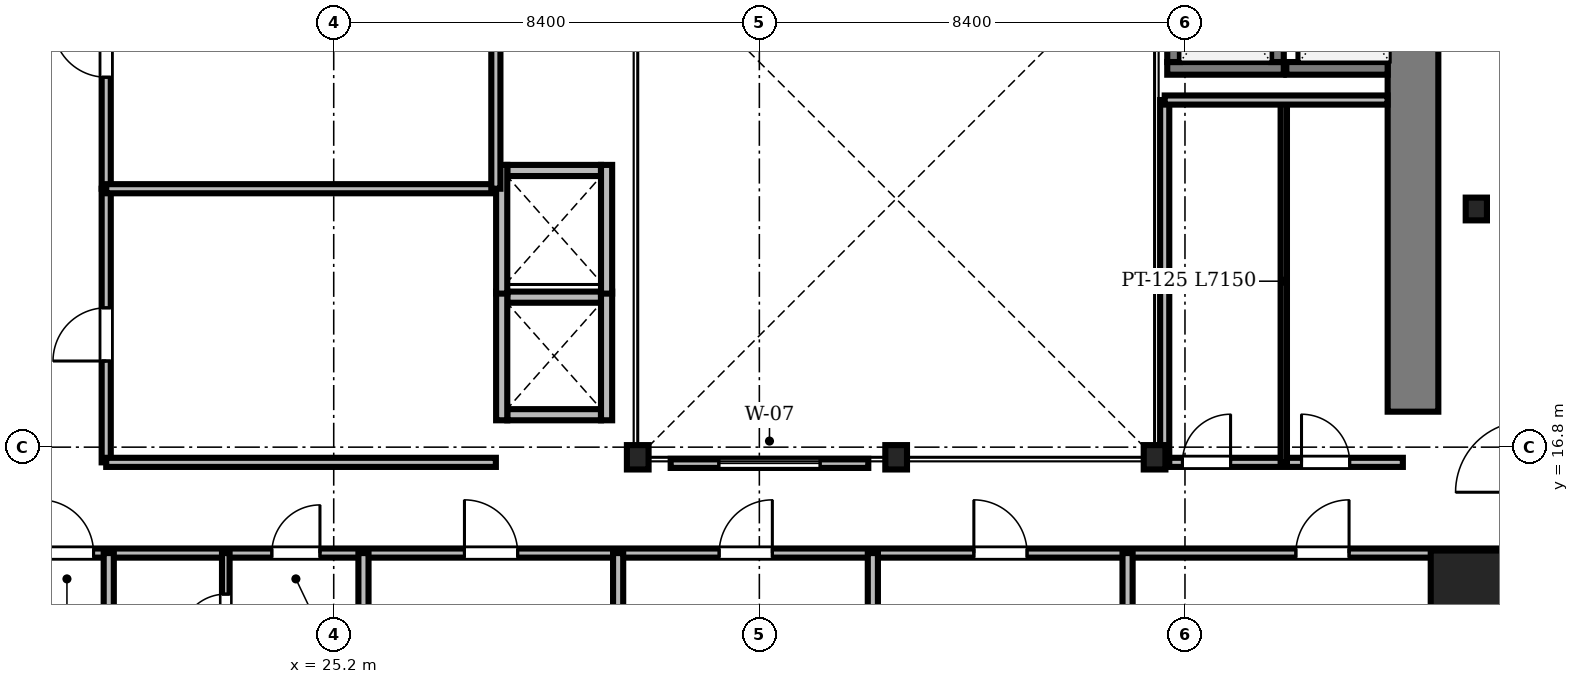
"""IFC4 building model, lengths in metres.
Left out: names, types, materials, properties, quantities, classifications, styles, units other than length and angle.
Written with IfcOpenShell. Run it as: python <this file> out.ifc"""

import sys

from ifc_helpers import new_model, si_unit, direction, frame, frame_2d, origin, origin_2d, place, context, subcontext, project, spatial, rectangle, i_section, extrude, source, transform, mapped, element, fill, save


model = new_model("IFC4")
c1 = context("Model", 3, precision=1e-05, world=origin(), true_north=direction((0.0, 1.0)))
c2 = subcontext(c1, "Body", "Model", "MODEL_VIEW")
j1 = project(units=[si_unit("LENGTHUNIT", "METRE"), si_unit("PLANEANGLEUNIT", "RADIAN")], contexts=[c1])
p1 = place(None, origin())
s1 = spatial("IfcSite", under=j1, at=p1, CompositionType="ELEMENT")
p2 = place(p1, origin())
s2 = spatial("IfcBuilding", under=s1, at=p2, CompositionType="ELEMENT")
p3 = place(p2, frame((0.0, 0.0, 42.2)))
s3 = spatial("IfcBuildingStorey", under=s2, at=p3, CompositionType="ELEMENT", Elevation=42.2)
m1 = source(origin(), c2, "Body", "SweptSolid", [
    extrude(rectangle(XDim=13.15, YDim=1.0, at=frame_2d((6.575, 0.0))), origin(), (0.0, 0.0, 1.0), 3.41),
])
p4 = place(p3, frame((46.5, 17.5, 0.0), z_axis=(0.0, 0.0, 1.0), x_axis=(0.0, 1.0, 0.0)))
e1 = element("IfcWall", 1, at=p4, inside=s3, PredefinedType="SHEAR", context=c2, shape_type="MappedRepresentation", body=[
    mapped(m1, transform((0.0, 0.0, 0.0), scale=1.0)),
])
m2 = source(origin(), c2, "Body", "SweptSolid", [
    extrude(i_section(OverallWidth=0.428, OverallDepth=0.481, WebThickness=0.04, FlangeThickness=0.063, FilletRadius=0.015, at=origin_2d()), origin(), (0.0, 0.0, 1.0), 3.41),
])
for number, where, z_axis, x_axis in (
    (2, (31.2, 16.6, 0.0), (0.0, 0.0, 1.0), (1.0, 0.0, 0.0)),
    (3, (36.3, 16.6, 0.0), (0.0, 0.0, 1.0), (1.0, 0.0, 0.0)),
    (4, (41.4, 16.6, 0.0), (0.0, 0.0, 1.0), (1.0, 0.0, 0.0)),
):
    element("IfcColumn", number, at=place(p3, frame(where, z_axis=z_axis, x_axis=x_axis)), inside=s3, PredefinedType="COLUMN", context=c2, shape_type="MappedRepresentation", body=[
        mapped(m2, transform((0.0, 0.0, 0.0), scale=1.0)),
    ])
m3 = source(origin(), c2, "Body", "SweptSolid", [
    extrude(rectangle(XDim=1.8, YDim=1.8, at=origin_2d()), origin(), (0.0, 0.0, 1.0), 3.41),
])
p5 = place(p3, frame((47.75, 13.86, 0.0), z_axis=(0.0, 0.0, 1.0), x_axis=(1.0, 0.0, 0.0)))
e5 = element("IfcColumn", 5, at=p5, inside=s3, PredefinedType="COLUMN", context=c2, shape_type="MappedRepresentation", body=[
    mapped(m3, transform((0.0, 0.0, 0.0), scale=1.0)),
])
m4 = source(origin(), c2, "Body", "SweptSolid", [
    extrude(i_section(OverallWidth=0.419, OverallDepth=0.449, WebThickness=0.031, FlangeThickness=0.048, FilletRadius=0.015, at=origin_2d()), origin(), (0.0, 0.0, 1.0), 3.41),
])
p6 = place(p3, frame((47.75, 21.5, 0.0), z_axis=(0.0, 0.0, 1.0), x_axis=(1.0, 0.0, 0.0)))
e6 = element("IfcColumn", 6, at=p6, inside=s3, PredefinedType="COLUMN", context=c2, shape_type="MappedRepresentation", body=[
    mapped(m4, transform((0.0, 0.0, 0.0), scale=1.0)),
])
m5 = source(origin(), c2, "Body", "SweptSolid", [
    extrude(rectangle(XDim=1.85, YDim=0.22, at=frame_2d((0.925, 0.0))), origin(), (0.0, 0.0, 1.0), 3.41),
])
for number, where, z_axis, x_axis in (
    (7, (28.625, 17.44, 0.0), (0.0, 0.0, 1.0), (1.0, 0.0, 0.0)),
    (8, (28.625, 19.76, 0.0), (0.0, 0.0, 1.0), (1.0, 0.0, 0.0)),
):
    element("IfcWall", number, at=place(p3, frame(where, z_axis=z_axis, x_axis=x_axis)), inside=s3, PredefinedType="SOLIDWALL", context=c2, shape_type="MappedRepresentation", body=[
        mapped(m5, transform((0.0, 0.0, 0.0), scale=1.0)),
    ])
m6 = source(origin(), c2, "Body", "SweptSolid", [
    extrude(rectangle(XDim=2.54, YDim=0.22, at=frame_2d((1.27, 0.0))), origin(), (0.0, 0.0, 1.0), 3.41),
])
for number, where, z_axis, x_axis in (
    (9, (28.515, 17.33, 0.0), (0.0, 0.0, 1.0), (0.0, 1.0, 0.0)),
    (10, (30.585, 17.33, 0.0), (0.0, 0.0, 1.0), (0.0, 1.0, 0.0)),
):
    element("IfcWall", number, at=place(p3, frame(where, z_axis=z_axis, x_axis=x_axis)), inside=s3, PredefinedType="SOLIDWALL", context=c2, shape_type="MappedRepresentation", body=[
        mapped(m6, transform((0.0, 0.0, 0.0), scale=1.0)),
    ])
p7 = place(p3, frame((28.625, 22.26, 0.0), z_axis=(0.0, 0.0, 1.0), x_axis=(1.0, 0.0, 0.0)))
e11 = element("IfcWall", 11, at=p7, inside=s3, PredefinedType="SOLIDWALL", context=c2, shape_type="MappedRepresentation", body=[
    mapped(m5, transform((0.0, 0.0, 0.0), scale=1.0)),
])
for number, where, z_axis, x_axis in (
    (12, (28.515, 19.83, 0.0), (0.0, 0.0, 1.0), (0.0, 1.0, 0.0)),
    (13, (30.585, 19.83, 0.0), (0.0, 0.0, 1.0), (0.0, 1.0, 0.0)),
):
    element("IfcWall", number, at=place(p3, frame(where, z_axis=z_axis, x_axis=x_axis)), inside=s3, PredefinedType="SOLIDWALL", context=c2, shape_type="MappedRepresentation", body=[
        mapped(m6, transform((0.0, 0.0, 0.0), scale=1.0)),
    ])
m7 = source(origin(), c2, "Body", "SweptSolid", [
    extrude(rectangle(XDim=2.3, YDim=0.25, at=frame_2d((1.15, 0.0))), origin(), (0.0, 0.0, 1.0), 3.41),
])
for number, where, z_axis, x_axis in (
    (14, (41.65, 24.275, 0.0), (0.0, 0.0, 1.0), (1.0, 0.0, 0.0)),
    (15, (41.775, 24.4, 0.0), (0.0, 0.0, 1.0), (0.0, 1.0, 0.0)),
    (16, (43.825, 24.4, 0.0), (0.0, 0.0, 1.0), (0.0, 1.0, 0.0)),
):
    element("IfcWall", number, at=place(p3, frame(where, z_axis=z_axis, x_axis=x_axis)), inside=s3, PredefinedType="SOLIDWALL", context=c2, shape_type="MappedRepresentation", body=[
        mapped(m7, transform((0.0, 0.0, 0.0), scale=1.0)),
    ])
m8 = source(origin(), c2, "Body", "SweptSolid", [
    extrude(rectangle(XDim=2.0, YDim=0.25, at=frame_2d((1.0, 0.0))), origin(), (0.0, 0.0, 1.0), 3.41),
])
p8 = place(p3, frame((44.0, 24.275, 0.0), z_axis=(0.0, 0.0, 1.0), x_axis=(1.0, 0.0, 0.0)))
e17 = element("IfcWall", 17, at=p8, inside=s3, PredefinedType="SOLIDWALL", context=c2, shape_type="MappedRepresentation", body=[
    mapped(m8, transform((0.0, 0.0, 0.0), scale=1.0)),
])
m9 = source(origin(), c2, "Body", "SweptSolid", [
    extrude(rectangle(XDim=46.156, YDim=0.18, at=frame_2d((23.078, 0.0))), origin(), (0.0, 0.0, 1.0), 2.652),
])
p9 = place(p3, frame((2.422, 14.71, 0.0), z_axis=(0.0, 0.0, 1.0), x_axis=(1.0, 0.0, 0.0)))
e18 = element("IfcWall", 18, at=p9, inside=s3, PredefinedType="PARTITIONING", context=c2, shape_type="MappedRepresentation", body=[
    mapped(m9, transform((0.0, 0.0, 0.0), scale=1.0)),
])
m10 = source(origin(), c2, "Body", "SweptSolid", [
    extrude(rectangle(XDim=1.05, YDim=2.2, at=frame_2d((0.525, 1.1))), frame((0.0, 0.1, 0.0), z_axis=(0.0, -1.0, 0.0), x_axis=(1.0, 0.0, 0.0)), (0.0, 0.0, 1.0), 0.2),
])
p10 = place(p9, frame((16.988, 0.0, 0.0)))
e19 = element("IfcOpeningElement", 19, at=p10, cuts=e18, PredefinedType="OPENING", context=c2, shape_type="MappedRepresentation", body=[
    mapped(m10, transform((0.0, 0.0, 0.0), scale=1.0)),
])
m11 = source(origin(), c2, "Body", "SweptSolid", [
    extrude(rectangle(XDim=0.95, YDim=2.15, at=frame_2d((0.475, 1.075))), frame((0.0, 0.1, 0.0), z_axis=(0.0, -1.0, 0.0), x_axis=(1.0, 0.0, 0.0)), (0.0, 0.0, 1.0), 0.2),
])
p11 = place(p9, frame((21.556, 0.0, 0.0)))
e20 = element("IfcOpeningElement", 20, at=p11, cuts=e18, PredefinedType="OPENING", context=c2, shape_type="MappedRepresentation", body=[
    mapped(m11, transform((0.0, 0.0, 0.0), scale=1.0)),
])
p12 = place(p9, frame((25.358, 0.0, 0.0)))
e21 = element("IfcOpeningElement", 21, at=p12, cuts=e18, PredefinedType="OPENING", context=c2, shape_type="MappedRepresentation", body=[
    mapped(m10, transform((0.0, 0.0, 0.0), scale=1.0)),
])
p13 = place(p9, frame((30.385, 0.0, 0.0)))
e22 = element("IfcOpeningElement", 22, at=p13, cuts=e18, PredefinedType="OPENING", context=c2, shape_type="MappedRepresentation", body=[
    mapped(m10, transform((0.0, 0.0, 0.0), scale=1.0)),
])
p14 = place(p9, frame((35.411, 0.0, 0.0)))
e23 = element("IfcOpeningElement", 23, at=p14, cuts=e18, PredefinedType="OPENING", context=c2, shape_type="MappedRepresentation", body=[
    mapped(m10, transform((0.0, 0.0, 0.0), scale=1.0)),
])
p15 = place(p9, frame((41.766, 0.0, 0.0)))
e24 = element("IfcOpeningElement", 24, at=p15, cuts=e18, PredefinedType="OPENING", context=c2, shape_type="MappedRepresentation", body=[
    mapped(m10, transform((0.0, 0.0, 0.0), scale=1.0)),
])
m12 = source(origin(), c2, "Body", "SweptSolid", [
    extrude(rectangle(XDim=6.54, YDim=0.18, at=frame_2d((3.27, 0.0))), origin(), (0.0, 0.0, 1.0), 2.802),
])
p16 = place(p3, frame((20.71, 21.9, 0.0), z_axis=(0.0, 0.0, 1.0), x_axis=(0.0, 1.0, 0.0)))
e25 = element("IfcWall", 25, at=p16, inside=s3, PredefinedType="PARTITIONING", context=c2, shape_type="MappedRepresentation", body=[
    mapped(m12, transform((0.0, 0.0, 0.0), scale=1.0)),
])
p17 = place(p16, frame((2.2, 0.0, 0.0)))
e26 = element("IfcOpeningElement", 26, at=p17, cuts=e25, PredefinedType="OPENING", context=c2, shape_type="MappedRepresentation", body=[
    mapped(m10, transform((0.0, 0.0, 0.0), scale=1.0)),
])
m13 = source(origin(), c2, "Body", "SweptSolid", [
    extrude(rectangle(XDim=5.4, YDim=0.18, at=frame_2d((2.7, 0.0))), origin(), (0.0, 0.0, 1.0), 2.802),
])
p18 = place(p3, frame((20.71, 16.5, 0.0), z_axis=(0.0, 0.0, 1.0), x_axis=(0.0, 1.0, 0.0)))
e27 = element("IfcWall", 27, at=p18, inside=s3, PredefinedType="PARTITIONING", context=c2, shape_type="MappedRepresentation", body=[
    mapped(m13, transform((0.0, 0.0, 0.0), scale=1.0)),
])
p19 = place(p18, frame((2.0, 0.0, 0.0)))
e28 = element("IfcOpeningElement", 28, at=p19, cuts=e27, PredefinedType="OPENING", context=c2, shape_type="MappedRepresentation", body=[
    mapped(m10, transform((0.0, 0.0, 0.0), scale=1.0)),
])
m14 = source(origin(), c2, "Body", "SweptSolid", [
    extrude(rectangle(XDim=4.7, YDim=0.18, at=frame_2d((2.35, 0.0))), origin(), (0.0, 0.0, 1.0), 2.802),
])
p20 = place(p3, frame((41.6, 16.5, 0.0), z_axis=(0.0, 0.0, 1.0), x_axis=(1.0, 0.0, 0.0)))
e29 = element("IfcWall", 29, at=p20, inside=s3, PredefinedType="PARTITIONING", context=c2, shape_type="MappedRepresentation", body=[
    mapped(m14, transform((0.0, 0.0, 0.0), scale=1.0)),
])
p21 = place(p20, frame((0.35, 0.0, 0.0)))
e30 = element("IfcOpeningElement", 30, at=p21, cuts=e29, PredefinedType="OPENING", context=c2, shape_type="MappedRepresentation", body=[
    mapped(m11, transform((0.0, 0.0, 0.0), scale=1.0)),
])
p22 = place(p20, frame((2.7, 0.0, 0.0)))
e31 = element("IfcOpeningElement", 31, at=p22, cuts=e29, PredefinedType="OPENING", context=c2, shape_type="MappedRepresentation", body=[
    mapped(m11, transform((0.0, 0.0, 0.0), scale=1.0)),
])
m15 = source(origin(), c2, "Body", "SweptSolid", [
    extrude(rectangle(XDim=2.36, YDim=0.15, at=frame_2d((1.18, 0.0))), origin(), (0.0, 0.0, 1.0), 3.41),
])
p23 = place(p3, frame((23.07, 12.35, 0.0), z_axis=(0.0, 0.0, 1.0), x_axis=(0.0, 1.0, 0.0)))
e32 = element("IfcWall", 32, at=p23, inside=s3, PredefinedType="PARTITIONING", context=c2, shape_type="MappedRepresentation", body=[
    mapped(m15, transform((0.0, 0.0, 0.0), scale=1.0)),
])
m16 = source(origin(), c2, "Body", "SweptSolid", [
    extrude(rectangle(XDim=0.9, YDim=2.1, at=frame_2d((0.45, 1.05))), frame((0.0, 0.085, 0.0), z_axis=(0.0, -1.0, 0.0), x_axis=(1.0, 0.0, 0.0)), (0.0, 0.0, 1.0), 0.17),
])
p24 = place(p23, frame((0.65, 0.0, 0.0)))
e33 = element("IfcOpeningElement", 33, at=p24, cuts=e32, PredefinedType="OPENING", context=c2, shape_type="MappedRepresentation", body=[
    mapped(m16, transform((0.0, 0.0, 0.0), scale=1.0)),
])
m17 = source(origin(), c2, "Body", "SweptSolid", [
    extrude(rectangle(XDim=12.588, YDim=0.2, at=frame_2d((6.294, 0.0))), origin(), (0.0, 0.0, 1.0), 2.652),
])
p25 = place(p3, frame((20.76, 2.122, 0.0), z_axis=(0.0, 0.0, 1.0), x_axis=(0.0, 1.0, 0.0)))
e34 = element("IfcWall", 34, at=p25, inside=s3, PredefinedType="PARTITIONING", context=c2, shape_type="MappedRepresentation", body=[
    mapped(m17, transform((0.0, 0.0, 0.0), scale=1.0)),
])
m18 = source(origin(), c2, "Body", "SweptSolid", [
    extrude(rectangle(XDim=12.78, YDim=0.2, at=frame_2d((6.39, 0.0))), origin(), (0.0, 0.0, 1.0), 2.652),
])
p26 = place(p3, frame((25.787, 1.93, 0.0), z_axis=(0.0, 0.0, 1.0), x_axis=(0.0, 1.0, 0.0)))
e35 = element("IfcWall", 35, at=p26, inside=s3, PredefinedType="PARTITIONING", context=c2, shape_type="MappedRepresentation", body=[
    mapped(m18, transform((0.0, 0.0, 0.0), scale=1.0)),
])
for number, where, z_axis, x_axis in (
    (36, (30.813, 2.122, 0.0), (0.0, 0.0, 1.0), (0.0, 1.0, 0.0)),
    (37, (35.84, 2.122, 0.0), (0.0, 0.0, 1.0), (0.0, 1.0, 0.0)),
    (38, (40.867, 2.122, 0.0), (0.0, 0.0, 1.0), (0.0, 1.0, 0.0)),
):
    element("IfcWall", number, at=place(p3, frame(where, z_axis=z_axis, x_axis=x_axis)), inside=s3, PredefinedType="PARTITIONING", context=c2, shape_type="MappedRepresentation", body=[
        mapped(m17, transform((0.0, 0.0, 0.0), scale=1.0)),
    ])
m19 = source(origin(), c2, "Body", "SweptSolid", [
    extrude(rectangle(XDim=7.69, YDim=0.18, at=frame_2d((3.845, 0.0))), origin(), (0.0, 0.0, 1.0), 2.802),
])
p27 = place(p3, frame((20.71, 16.5, 0.0), z_axis=(0.0, 0.0, 1.0), x_axis=(1.0, 0.0, 0.0)))
e39 = element("IfcWall", 39, at=p27, inside=s3, PredefinedType="PARTITIONING", context=c2, shape_type="MappedRepresentation", body=[
    mapped(m19, transform((0.0, 0.0, 0.0), scale=1.0)),
])
m20 = source(origin(), c2, "Body", "SweptSolid", [
    extrude(rectangle(XDim=7.69, YDim=0.18, at=frame_2d((3.845, 0.0))), origin(), (0.0, 0.0, 1.0), 3.41),
])
p28 = place(p3, frame((20.71, 21.9, 0.0), z_axis=(0.0, 0.0, 1.0), x_axis=(1.0, 0.0, 0.0)))
e40 = element("IfcWall", 40, at=p28, inside=s3, PredefinedType="PARTITIONING", context=c2, shape_type="MappedRepresentation", body=[
    mapped(m20, transform((0.0, 0.0, 0.0), scale=1.0)),
])
m21 = source(origin(), c2, "Body", "SweptSolid", [
    extrude(rectangle(XDim=7.15, YDim=0.18, at=frame_2d((3.575, 0.0))), origin(), (0.0, 0.0, 1.0), 2.802),
])
p29 = place(p3, frame((41.6, 16.5, 0.0), z_axis=(0.0, 0.0, 1.0), x_axis=(0.0, 1.0, 0.0)))
e41 = element("IfcWall", 41, at=p29, inside=s3, PredefinedType="PARTITIONING", context=c2, shape_type="MappedRepresentation", body=[
    mapped(m21, transform((0.0, 0.0, 0.0), scale=1.0)),
])
m22 = source(origin(), c2, "Body", "SweptSolid", [
    extrude(rectangle(XDim=7.15, YDim=0.125, at=frame_2d((3.575, 0.0))), origin(), (0.0, 0.0, 1.0), 2.802),
])
p30 = place(p3, frame((43.95, 16.5, 0.0), z_axis=(0.0, 0.0, 1.0), x_axis=(0.0, 1.0, 0.0)))
e42 = element("IfcWall", 42, at=p30, inside=s3, PredefinedType="PARTITIONING", context=c2, shape_type="MappedRepresentation", body=[
    mapped(m22, transform((0.0, 0.0, 0.0), scale=1.0)),
])
p31 = place(p3, frame((28.4, 21.9, 0.0), z_axis=(0.0, 0.0, 1.0), x_axis=(0.0, 1.0, 0.0)))
e43 = element("IfcWall", 43, at=p31, inside=s3, PredefinedType="PARTITIONING", context=c2, shape_type="MappedRepresentation", body=[
    mapped(m12, transform((0.0, 0.0, 0.0), scale=1.0)),
])
m23 = source(origin(), c2, "Body", "SweptSolid", [
    extrude(rectangle(XDim=4.398, YDim=0.18, at=frame_2d((2.199, 0.0))), origin(), (0.0, 0.0, 1.0), 3.41),
])
p32 = place(p3, frame((41.6, 23.65, 0.0), z_axis=(0.0, 0.0, 1.0), x_axis=(1.0, 0.0, 0.0)))
e44 = element("IfcWall", 44, at=p32, inside=s3, PredefinedType="PARTITIONING", context=c2, shape_type="MappedRepresentation", body=[
    mapped(m23, transform((0.0, 0.0, 0.0), scale=1.0)),
])
m24 = source(origin(), c2, "Body", "SweptSolid", [
    extrude(rectangle(XDim=3.9, YDim=0.18, at=frame_2d((1.95, 0.0))), origin(), (0.0, 0.0, 1.0), 2.952),
])
p33 = place(p3, frame((31.85, 16.48, 0.0), z_axis=(0.0, 0.0, 1.0), x_axis=(1.0, 0.0, 0.0)))
e45 = element("IfcWall", 45, at=p33, inside=s3, PredefinedType="PARTITIONING", context=c2, shape_type="MappedRepresentation", body=[
    mapped(m24, transform((0.0, 0.0, 0.0), scale=1.0)),
])
m25 = source(origin(), c2, "Body", "SweptSolid", [
    extrude(rectangle(XDim=2.0, YDim=1.9, at=frame_2d((1.0, 0.95))), frame((0.0, 0.1, 0.0), z_axis=(0.0, -1.0, 0.0), x_axis=(1.0, 0.0, 0.0)), (0.0, 0.0, 1.0), 0.2),
])
p34 = place(p33, frame((0.95, 0.0, 0.55)))
e46 = element("IfcOpeningElement", 46, at=p34, cuts=e45, PredefinedType="OPENING", context=c2, shape_type="MappedRepresentation", body=[
    mapped(m25, transform((0.0, 0.0, 0.0), scale=1.0)),
])
m26 = source(origin(), c2, "Body", "SweptSolid", [
    extrude(rectangle(XDim=1.05, YDim=2.2, at=frame_2d((0.525, 1.1))), frame((0.0, 0.025, 0.0), z_axis=(0.0, -1.0, 0.0), x_axis=(1.0, 0.0, 0.0)), (0.0, 0.0, 1.0), 0.05),
])
p35 = place(p10, origin())
e47 = element("IfcDoor", 47, at=p35, inside=s3, OperationType="SINGLE_SWING_LEFT", PredefinedType="DOOR", context=c2, shape_type="MappedRepresentation", body=[
    mapped(m26, transform((0.0, 0.0, 0.0), scale=1.0)),
])
fill(e19, e47)
m27 = source(origin(), c2, "Body", "SweptSolid", [
    extrude(rectangle(XDim=0.95, YDim=2.15, at=frame_2d((0.475, 1.075))), frame((0.0, 0.025, 0.0), z_axis=(0.0, -1.0, 0.0), x_axis=(1.0, 0.0, 0.0)), (0.0, 0.0, 1.0), 0.05),
])
p36 = place(p11, origin())
e48 = element("IfcDoor", 48, at=p36, inside=s3, OperationType="SINGLE_SWING_RIGHT", PredefinedType="DOOR", context=c2, shape_type="MappedRepresentation", body=[
    mapped(m27, transform((0.0, 0.0, 0.0), scale=1.0)),
])
fill(e20, e48)
p37 = place(p12, origin())
e49 = element("IfcDoor", 49, at=p37, inside=s3, OperationType="SINGLE_SWING_LEFT", PredefinedType="DOOR", context=c2, shape_type="MappedRepresentation", body=[
    mapped(m26, transform((0.0, 0.0, 0.0), scale=1.0)),
])
fill(e21, e49)
p38 = place(p13, origin())
e50 = element("IfcDoor", 50, at=p38, inside=s3, OperationType="SINGLE_SWING_RIGHT", PredefinedType="DOOR", context=c2, shape_type="MappedRepresentation", body=[
    mapped(m26, transform((0.0, 0.0, 0.0), scale=1.0)),
])
fill(e22, e50)
p39 = place(p14, origin())
e51 = element("IfcDoor", 51, at=p39, inside=s3, OperationType="SINGLE_SWING_LEFT", PredefinedType="DOOR", context=c2, shape_type="MappedRepresentation", body=[
    mapped(m26, transform((0.0, 0.0, 0.0), scale=1.0)),
])
fill(e23, e51)
p40 = place(p15, origin())
e52 = element("IfcDoor", 52, at=p40, inside=s3, OperationType="SINGLE_SWING_RIGHT", PredefinedType="DOOR", context=c2, shape_type="MappedRepresentation", body=[
    mapped(m26, transform((0.0, 0.0, 0.0), scale=1.0)),
])
fill(e24, e52)
p41 = place(p17, origin())
e53 = element("IfcDoor", 53, at=p41, inside=s3, OperationType="SINGLE_SWING_RIGHT", PredefinedType="DOOR", context=c2, shape_type="MappedRepresentation", body=[
    mapped(m26, transform((0.0, 0.0, 0.0), scale=1.0)),
])
fill(e26, e53)
p42 = place(p19, origin())
e54 = element("IfcDoor", 54, at=p42, inside=s3, OperationType="SINGLE_SWING_LEFT", PredefinedType="DOOR", context=c2, shape_type="MappedRepresentation", body=[
    mapped(m26, transform((0.0, 0.0, 0.0), scale=1.0)),
])
fill(e28, e54)
p43 = place(p21, origin())
e55 = element("IfcDoor", 55, at=p43, inside=s3, OperationType="SINGLE_SWING_RIGHT", PredefinedType="DOOR", context=c2, shape_type="MappedRepresentation", body=[
    mapped(m27, transform((0.0, 0.0, 0.0), scale=1.0)),
])
fill(e30, e55)
p44 = place(p22, origin())
e56 = element("IfcDoor", 56, at=p44, inside=s3, OperationType="SINGLE_SWING_LEFT", PredefinedType="DOOR", context=c2, shape_type="MappedRepresentation", body=[
    mapped(m27, transform((0.0, 0.0, 0.0), scale=1.0)),
])
fill(e31, e56)
m28 = source(origin(), c2, "Body", "SweptSolid", [
    extrude(rectangle(XDim=0.9, YDim=2.1, at=frame_2d((0.45, 1.05))), frame((0.0, 0.025, 0.0), z_axis=(0.0, -1.0, 0.0), x_axis=(1.0, 0.0, 0.0)), (0.0, 0.0, 1.0), 0.05),
])
p45 = place(p24, origin())
e57 = element("IfcDoor", 57, at=p45, inside=s3, OperationType="SINGLE_SWING_LEFT", PredefinedType="DOOR", context=c2, shape_type="MappedRepresentation", body=[
    mapped(m28, transform((0.0, 0.0, 0.0), scale=1.0)),
])
fill(e33, e57)
m29 = source(origin(), c2, "Body", "SweptSolid", [
    extrude(rectangle(XDim=2.0, YDim=1.9, at=frame_2d((1.0, 0.95))), frame((0.0, 0.03, 0.0), z_axis=(0.0, -1.0, 0.0), x_axis=(1.0, 0.0, 0.0)), (0.0, 0.0, 1.0), 0.06),
])
p46 = place(p34, origin())
e58 = element("IfcWindow", 58, at=p46, inside=s3, PartitioningType="SINGLE_PANEL", PredefinedType="WINDOW", context=c2, shape_type="MappedRepresentation", body=[
    mapped(m29, transform((0.0, 0.0, 0.0), scale=1.0)),
])
fill(e46, e58)
save(model, sys.argv[1])
